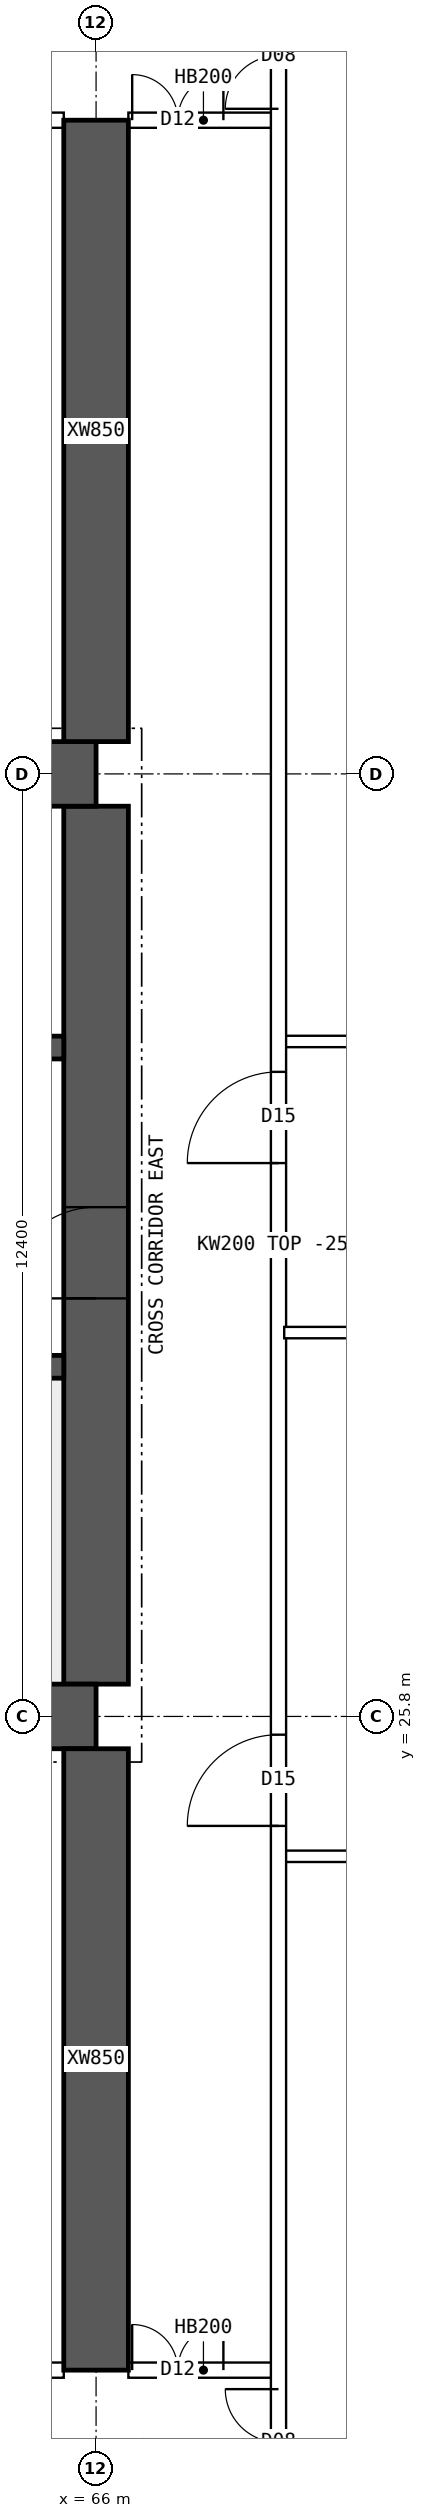
"""IFC4 building model, lengths in metres.
Left out: names, types, materials, properties, quantities, classifications, styles, units other than length and angle.
Written with IfcOpenShell. Run it as: python <this file> out.ifc"""

import sys

from ifc_helpers import new_model, si_unit, direction, frame, frame_2d, origin, place, context, subcontext, project, spatial, polyline, rectangle, outline, extrude, element, fill, save


model = new_model("IFC4")
c1 = context("Model", 3, precision=1e-05, world=origin(), true_north=direction((0.0, 1.0)))
c2 = subcontext(c1, "Body", "Model", "MODEL_VIEW")
j1 = project(units=[si_unit("LENGTHUNIT", "METRE"), si_unit("PLANEANGLEUNIT", "RADIAN")], contexts=[c1])
p1 = place(None, origin())
s1 = spatial("IfcSite", under=j1, at=p1, CompositionType="ELEMENT")
p2 = place(p1, origin())
s2 = spatial("IfcBuilding", under=s1, at=p2, CompositionType="ELEMENT")
p3 = place(p2, frame((0.0, 0.0, 163.6)))
s3 = spatial("IfcBuildingStorey", under=s2, at=p3, CompositionType="ELEMENT", Elevation=163.6)
for number, where, z_axis, x_axis in (
    (1, (18.0, 25.8, 0.0), (0.0, 0.0, 1.0), (1.0, 0.0, 0.0)),
    (2, (18.0, 38.2, 0.0), (0.0, 0.0, 1.0), (1.0, 0.0, 0.0)),
):
    element("IfcWall", number, at=place(p3, frame(where, z_axis=z_axis, x_axis=x_axis)), inside=s3, PredefinedType="SHEAR", context=c2, shape_type="SweptSolid", body=[
        extrude(rectangle(XDim=48.0, YDim=0.85, at=frame_2d((24.0, 0.0))), origin(), (0.0, 0.0, 1.0), 3.75),
    ])
p4 = place(p3, frame((66.0, 26.225, 0.0), z_axis=(0.0, 0.0, 1.0), x_axis=(0.0, 1.0, 0.0)))
e3 = element("IfcWall", 3, at=p4, inside=s3, PredefinedType="SHEAR", context=c2, shape_type="SweptSolid", body=[
    extrude(rectangle(XDim=11.55, YDim=0.85, at=frame_2d((5.775, 0.0))), origin(), (0.0, 0.0, 1.0), 3.75),
])
p5 = place(p4, frame((5.075, 0.0, 0.0)))
e4 = element("IfcOpeningElement", 4, at=p5, cuts=e3, PredefinedType="OPENING", context=c2, shape_type="SweptSolid", body=[
    extrude(rectangle(XDim=1.2, YDim=2.1, at=frame_2d((0.6, 1.05))), frame((0.0, 0.435, 0.0), z_axis=(0.0, -1.0, 0.0), x_axis=(1.0, 0.0, 0.0)), (0.0, 0.0, 1.0), 0.87),
])
p6 = place(p3, frame((18.425, 30.4, 0.0), z_axis=(0.0, 0.0, 1.0), x_axis=(1.0, 0.0, 0.0)))
e5 = element("IfcWall", 5, at=p6, inside=s3, PredefinedType="SHEAR", context=c2, shape_type="SweptSolid", body=[
    extrude(rectangle(XDim=47.15, YDim=0.3, at=frame_2d((23.575, 0.0))), origin(), (0.0, 0.0, 1.0), 3.75),
])
p7 = place(p6, frame((0.4, 0.0, 0.0)))
e6 = element("IfcOpeningElement", 6, at=p7, cuts=e5, PredefinedType="OPENING", context=c2, shape_type="SweptSolid", body=[
    extrude(rectangle(XDim=1.0, YDim=2.1, at=frame_2d((0.5, 1.05))), frame((0.0, 0.16, 0.0), z_axis=(0.0, -1.0, 0.0), x_axis=(1.0, 0.0, 0.0)), (0.0, 0.0, 1.0), 0.32),
])
p8 = place(p6, frame((45.75, 0.0, 0.0)))
e7 = element("IfcOpeningElement", 7, at=p8, cuts=e5, PredefinedType="OPENING", context=c2, shape_type="SweptSolid", body=[
    extrude(rectangle(XDim=1.0, YDim=2.1, at=frame_2d((0.5, 1.05))), frame((0.0, 0.16, 0.0), z_axis=(0.0, -1.0, 0.0), x_axis=(1.0, 0.0, 0.0)), (0.0, 0.0, 1.0), 0.32),
])
p9 = place(p6, frame((8.325, 0.0, 0.0)))
e8 = element("IfcOpeningElement", 8, at=p9, cuts=e5, PredefinedType="OPENING", context=c2, shape_type="SweptSolid", body=[
    extrude(rectangle(XDim=1.1, YDim=2.1, at=frame_2d((0.55, 1.05))), frame((0.0, 0.16, 0.0), z_axis=(0.0, -1.0, 0.0), x_axis=(1.0, 0.0, 0.0)), (0.0, 0.0, 1.0), 0.32),
])
p10 = place(p6, frame((10.925, 0.0, 0.0)))
e9 = element("IfcOpeningElement", 9, at=p10, cuts=e5, PredefinedType="OPENING", context=c2, shape_type="SweptSolid", body=[
    extrude(rectangle(XDim=1.1, YDim=2.1, at=frame_2d((0.55, 1.05))), frame((0.0, 0.16, 0.0), z_axis=(0.0, -1.0, 0.0), x_axis=(1.0, 0.0, 0.0)), (0.0, 0.0, 1.0), 0.32),
])
p11 = place(p6, frame((13.525, 0.0, 0.0)))
e10 = element("IfcOpeningElement", 10, at=p11, cuts=e5, PredefinedType="OPENING", context=c2, shape_type="SweptSolid", body=[
    extrude(rectangle(XDim=1.1, YDim=2.1, at=frame_2d((0.55, 1.05))), frame((0.0, 0.16, 0.0), z_axis=(0.0, -1.0, 0.0), x_axis=(1.0, 0.0, 0.0)), (0.0, 0.0, 1.0), 0.32),
])
p12 = place(p6, frame((16.125, 0.0, 0.0)))
e11 = element("IfcOpeningElement", 11, at=p12, cuts=e5, PredefinedType="OPENING", context=c2, shape_type="SweptSolid", body=[
    extrude(rectangle(XDim=1.1, YDim=2.1, at=frame_2d((0.55, 1.05))), frame((0.0, 0.16, 0.0), z_axis=(0.0, -1.0, 0.0), x_axis=(1.0, 0.0, 0.0)), (0.0, 0.0, 1.0), 0.32),
])
p13 = place(p6, frame((18.9, 0.0, 0.0)))
e12 = element("IfcOpeningElement", 12, at=p13, cuts=e5, PredefinedType="OPENING", context=c2, shape_type="SweptSolid", body=[
    extrude(rectangle(XDim=0.9, YDim=2.1, at=frame_2d((0.45, 1.05))), frame((0.0, 0.16, 0.0), z_axis=(0.0, -1.0, 0.0), x_axis=(1.0, 0.0, 0.0)), (0.0, 0.0, 1.0), 0.32),
])
p14 = place(p6, frame((30.192, 0.0, 0.0)))
e13 = element("IfcOpeningElement", 13, at=p14, cuts=e5, PredefinedType="OPENING", context=c2, shape_type="SweptSolid", body=[
    extrude(rectangle(XDim=1.1, YDim=2.1, at=frame_2d((0.55, 1.05))), frame((0.0, 0.16, 0.0), z_axis=(0.0, -1.0, 0.0), x_axis=(1.0, 0.0, 0.0)), (0.0, 0.0, 1.0), 0.32),
])
p15 = place(p6, frame((33.725, 0.0, 0.0)))
e14 = element("IfcOpeningElement", 14, at=p15, cuts=e5, PredefinedType="OPENING", context=c2, shape_type="SweptSolid", body=[
    extrude(rectangle(XDim=1.1, YDim=2.1, at=frame_2d((0.55, 1.05))), frame((0.0, 0.16, 0.0), z_axis=(0.0, -1.0, 0.0), x_axis=(1.0, 0.0, 0.0)), (0.0, 0.0, 1.0), 0.32),
])
p16 = place(p6, frame((37.258, 0.0, 0.0)))
e15 = element("IfcOpeningElement", 15, at=p16, cuts=e5, PredefinedType="OPENING", context=c2, shape_type="SweptSolid", body=[
    extrude(rectangle(XDim=1.1, YDim=2.1, at=frame_2d((0.55, 1.05))), frame((0.0, 0.16, 0.0), z_axis=(0.0, -1.0, 0.0), x_axis=(1.0, 0.0, 0.0)), (0.0, 0.0, 1.0), 0.32),
])
p17 = place(p3, frame((18.425, 34.6, 0.0), z_axis=(0.0, 0.0, 1.0), x_axis=(1.0, 0.0, 0.0)))
e16 = element("IfcWall", 16, at=p17, inside=s3, PredefinedType="SHEAR", context=c2, shape_type="SweptSolid", body=[
    extrude(rectangle(XDim=47.15, YDim=0.3, at=frame_2d((23.575, 0.0))), origin(), (0.0, 0.0, 1.0), 3.75),
])
p18 = place(p17, frame((0.9, 0.0, 0.0)))
e17 = element("IfcOpeningElement", 17, at=p18, cuts=e16, PredefinedType="OPENING", context=c2, shape_type="SweptSolid", body=[
    extrude(rectangle(XDim=1.1, YDim=2.1, at=frame_2d((0.55, 1.05))), frame((0.0, 0.16, 0.0), z_axis=(0.0, -1.0, 0.0), x_axis=(1.0, 0.0, 0.0)), (0.0, 0.0, 1.0), 0.32),
])
p19 = place(p17, frame((45.15, 0.0, 0.0)))
e18 = element("IfcOpeningElement", 18, at=p19, cuts=e16, PredefinedType="OPENING", context=c2, shape_type="SweptSolid", body=[
    extrude(rectangle(XDim=1.1, YDim=2.1, at=frame_2d((0.55, 1.05))), frame((0.0, 0.16, 0.0), z_axis=(0.0, -1.0, 0.0), x_axis=(1.0, 0.0, 0.0)), (0.0, 0.0, 1.0), 0.32),
])
p20 = place(p17, frame((4.175, 0.0, 0.0)))
e19 = element("IfcOpeningElement", 19, at=p20, cuts=e16, PredefinedType="OPENING", context=c2, shape_type="SweptSolid", body=[
    extrude(rectangle(XDim=0.9, YDim=2.1, at=frame_2d((0.45, 1.05))), frame((0.0, 0.16, 0.0), z_axis=(0.0, -1.0, 0.0), x_axis=(1.0, 0.0, 0.0)), (0.0, 0.0, 1.0), 0.32),
])
p21 = place(p17, frame((42.075, 0.0, 0.0)))
e20 = element("IfcOpeningElement", 20, at=p21, cuts=e16, PredefinedType="OPENING", context=c2, shape_type="SweptSolid", body=[
    extrude(rectangle(XDim=0.9, YDim=2.1, at=frame_2d((0.45, 1.05))), frame((0.0, 0.16, 0.0), z_axis=(0.0, -1.0, 0.0), x_axis=(1.0, 0.0, 0.0)), (0.0, 0.0, 1.0), 0.32),
])
p22 = place(p17, frame((8.95, 0.0, 0.0)))
e21 = element("IfcOpeningElement", 21, at=p22, cuts=e16, PredefinedType="OPENING", context=c2, shape_type="SweptSolid", body=[
    extrude(rectangle(XDim=0.9, YDim=2.1, at=frame_2d((0.45, 1.05))), frame((0.0, 0.16, 0.0), z_axis=(0.0, -1.0, 0.0), x_axis=(1.0, 0.0, 0.0)), (0.0, 0.0, 1.0), 0.32),
])
p23 = place(p17, frame((12.924, 0.0, 0.0)))
e22 = element("IfcOpeningElement", 22, at=p23, cuts=e16, PredefinedType="OPENING", context=c2, shape_type="SweptSolid", body=[
    extrude(rectangle(XDim=0.9, YDim=2.1, at=frame_2d((0.45, 1.05))), frame((0.0, 0.16, 0.0), z_axis=(0.0, -1.0, 0.0), x_axis=(1.0, 0.0, 0.0)), (0.0, 0.0, 1.0), 0.32),
])
p24 = place(p17, frame((16.571, 0.0, 0.0)))
e23 = element("IfcOpeningElement", 23, at=p24, cuts=e16, PredefinedType="OPENING", context=c2, shape_type="SweptSolid", body=[
    extrude(rectangle(XDim=0.9, YDim=2.1, at=frame_2d((0.45, 1.05))), frame((0.0, 0.16, 0.0), z_axis=(0.0, -1.0, 0.0), x_axis=(1.0, 0.0, 0.0)), (0.0, 0.0, 1.0), 0.32),
])
p25 = place(p17, frame((20.33, 0.0, 0.0)))
e24 = element("IfcOpeningElement", 24, at=p25, cuts=e16, PredefinedType="OPENING", context=c2, shape_type="SweptSolid", body=[
    extrude(rectangle(XDim=0.9, YDim=2.1, at=frame_2d((0.45, 1.05))), frame((0.0, 0.16, 0.0), z_axis=(0.0, -1.0, 0.0), x_axis=(1.0, 0.0, 0.0)), (0.0, 0.0, 1.0), 0.32),
])
p26 = place(p17, frame((24.736, 0.0, 0.0)))
e25 = element("IfcOpeningElement", 25, at=p26, cuts=e16, PredefinedType="OPENING", context=c2, shape_type="SweptSolid", body=[
    extrude(rectangle(XDim=0.9, YDim=2.1, at=frame_2d((0.45, 1.05))), frame((0.0, 0.16, 0.0), z_axis=(0.0, -1.0, 0.0), x_axis=(1.0, 0.0, 0.0)), (0.0, 0.0, 1.0), 0.32),
])
p27 = place(p17, frame((27.533, 0.0, 0.0)))
e26 = element("IfcOpeningElement", 26, at=p27, cuts=e16, PredefinedType="OPENING", context=c2, shape_type="SweptSolid", body=[
    extrude(rectangle(XDim=0.9, YDim=2.1, at=frame_2d((0.45, 1.05))), frame((0.0, 0.16, 0.0), z_axis=(0.0, -1.0, 0.0), x_axis=(1.0, 0.0, 0.0)), (0.0, 0.0, 1.0), 0.32),
])
p28 = place(p17, frame((29.906, 0.0, 0.0)))
e27 = element("IfcOpeningElement", 27, at=p28, cuts=e16, PredefinedType="OPENING", context=c2, shape_type="SweptSolid", body=[
    extrude(rectangle(XDim=0.9, YDim=2.1, at=frame_2d((0.45, 1.05))), frame((0.0, 0.16, 0.0), z_axis=(0.0, -1.0, 0.0), x_axis=(1.0, 0.0, 0.0)), (0.0, 0.0, 1.0), 0.32),
])
p29 = place(p17, frame((33.756, 0.0, 0.0)))
e28 = element("IfcOpeningElement", 28, at=p29, cuts=e16, PredefinedType="OPENING", context=c2, shape_type="SweptSolid", body=[
    extrude(rectangle(XDim=0.9, YDim=2.1, at=frame_2d((0.45, 1.05))), frame((0.0, 0.16, 0.0), z_axis=(0.0, -1.0, 0.0), x_axis=(1.0, 0.0, 0.0)), (0.0, 0.0, 1.0), 0.32),
])
p30 = place(p17, frame((37.504, 0.0, 0.0)))
e29 = element("IfcOpeningElement", 29, at=p30, cuts=e16, PredefinedType="OPENING", context=c2, shape_type="SweptSolid", body=[
    extrude(rectangle(XDim=0.9, YDim=2.1, at=frame_2d((0.45, 1.05))), frame((0.0, 0.16, 0.0), z_axis=(0.0, -1.0, 0.0), x_axis=(1.0, 0.0, 0.0)), (0.0, 0.0, 1.0), 0.32),
])
for number, where, z_axis, x_axis in (
    (30, (66.0, 17.2, 0.0), (0.0, 0.0, 1.0), (0.0, 1.0, 0.0)),
    (31, (66.0, 38.625, 0.0), (0.0, 0.0, 1.0), (0.0, 1.0, 0.0)),
):
    element("IfcWall", number, at=place(p3, frame(where, z_axis=z_axis, x_axis=x_axis)), inside=s3, PredefinedType="SHEAR", context=c2, shape_type="SweptSolid", body=[
        extrude(rectangle(XDim=8.175, YDim=0.85, at=frame_2d((4.087, 0.0))), origin(), (0.0, 0.0, 1.0), 3.75),
    ])
p31 = place(p3, frame((60.425, 17.2, 0.0), z_axis=(0.0, 0.0, 1.0), x_axis=(1.0, 0.0, 0.0)))
e32 = element("IfcWall", 32, at=p31, inside=s3, PredefinedType="SOLIDWALL", context=c2, shape_type="SweptSolid", body=[
    extrude(rectangle(XDim=5.15, YDim=0.2, at=frame_2d((2.575, 0.0))), origin(), (0.0, 0.0, 1.0), 3.5),
])
p32 = place(p31, frame((0.45, 0.0, 0.0)))
e33 = element("IfcOpeningElement", 33, at=p32, cuts=e32, PredefinedType="OPENING", context=c2, shape_type="SweptSolid", body=[
    extrude(rectangle(XDim=1.0, YDim=2.1, at=frame_2d((0.5, 1.05))), frame((0.0, 0.11, 0.0), z_axis=(0.0, -1.0, 0.0), x_axis=(1.0, 0.0, 0.0)), (0.0, 0.0, 1.0), 0.22),
])
p33 = place(p3, frame((66.425, 17.2, 0.0), z_axis=(0.0, 0.0, 1.0), x_axis=(1.0, 0.0, 0.0)))
e34 = element("IfcWall", 34, at=p33, inside=s3, PredefinedType="SOLIDWALL", context=c2, shape_type="SweptSolid", body=[
    extrude(rectangle(XDim=1.975, YDim=0.2, at=frame_2d((0.987, 0.0))), origin(), (0.0, 0.0, 1.0), 3.5),
])
p34 = place(p33, frame((0.05, 0.0, 0.0)))
e35 = element("IfcOpeningElement", 35, at=p34, cuts=e34, PredefinedType="OPENING", context=c2, shape_type="SweptSolid", body=[
    extrude(rectangle(XDim=1.2, YDim=2.1, at=frame_2d((0.6, 1.05))), frame((0.0, 0.11, 0.0), z_axis=(0.0, -1.0, 0.0), x_axis=(1.0, 0.0, 0.0)), (0.0, 0.0, 1.0), 0.22),
])
p35 = place(p3, frame((60.425, 46.8, 0.0), z_axis=(0.0, 0.0, 1.0), x_axis=(1.0, 0.0, 0.0)))
e36 = element("IfcWall", 36, at=p35, inside=s3, PredefinedType="SOLIDWALL", context=c2, shape_type="SweptSolid", body=[
    extrude(rectangle(XDim=5.15, YDim=0.2, at=frame_2d((2.575, 0.0))), origin(), (0.0, 0.0, 1.0), 3.5),
])
p36 = place(p35, frame((0.15, 0.0, 0.0)))
e37 = element("IfcOpeningElement", 37, at=p36, cuts=e36, PredefinedType="OPENING", context=c2, shape_type="SweptSolid", body=[
    extrude(rectangle(XDim=0.9, YDim=2.1, at=frame_2d((0.45, 1.05))), frame((0.0, 0.11, 0.0), z_axis=(0.0, -1.0, 0.0), x_axis=(1.0, 0.0, 0.0)), (0.0, 0.0, 1.0), 0.22),
])
p37 = place(p35, frame((3.605, 0.0, 0.0)))
e38 = element("IfcOpeningElement", 38, at=p37, cuts=e36, PredefinedType="OPENING", context=c2, shape_type="SweptSolid", body=[
    extrude(rectangle(XDim=0.9, YDim=2.1, at=frame_2d((0.45, 1.05))), frame((0.0, 0.11, 0.0), z_axis=(0.0, -1.0, 0.0), x_axis=(1.0, 0.0, 0.0)), (0.0, 0.0, 1.0), 0.22),
])
p38 = place(p3, frame((66.425, 46.8, 0.0), z_axis=(0.0, 0.0, 1.0), x_axis=(1.0, 0.0, 0.0)))
e39 = element("IfcWall", 39, at=p38, inside=s3, PredefinedType="SOLIDWALL", context=c2, shape_type="SweptSolid", body=[
    extrude(rectangle(XDim=1.975, YDim=0.2, at=frame_2d((0.987, 0.0))), origin(), (0.0, 0.0, 1.0), 3.5),
])
p39 = place(p38, frame((0.05, 0.0, 0.0)))
e40 = element("IfcOpeningElement", 40, at=p39, cuts=e39, PredefinedType="OPENING", context=c2, shape_type="SweptSolid", body=[
    extrude(rectangle(XDim=1.2, YDim=2.1, at=frame_2d((0.6, 1.05))), frame((0.0, 0.11, 0.0), z_axis=(0.0, -1.0, 0.0), x_axis=(1.0, 0.0, 0.0)), (0.0, 0.0, 1.0), 0.22),
])
p40 = place(p3, frame((68.475, 30.85, 0.0), z_axis=(0.0, 0.0, 1.0), x_axis=(1.0, 0.0, 0.0)))
e41 = element("IfcWall", 41, at=p40, inside=s3, PredefinedType="PARTITIONING", context=c2, shape_type="SweptSolid", body=[
    extrude(outline(polyline([(0.0, 0.0), (6.82, 0.0), (6.82, 3.5), (3.827, 3.5), (3.825, 3.05), (3.227, 3.05), (3.225, 3.5), (0.0, 3.5), (0.0, 0.0)])), frame((0.0, 0.075, 0.0), z_axis=(0.0, -1.0, 0.0), x_axis=(1.0, 0.0, 0.0)), (0.0, 0.0, 1.0), 0.15),
])
p41 = place(p3, frame((68.4, 10.446, 0.0), z_axis=(0.0, 0.0, 1.0), x_axis=(0.0, 1.0, 0.0)))
e42 = element("IfcWall", 42, at=p41, inside=s3, PredefinedType="SOLIDWALL", context=c2, shape_type="SweptSolid", body=[
    extrude(rectangle(XDim=43.107, YDim=0.2, at=frame_2d((21.554, 0.0))), origin(), (0.0, 0.0, 1.0), 3.5),
])
p42 = place(p41, frame((13.914, 0.0, 0.0)))
e43 = element("IfcOpeningElement", 43, at=p42, cuts=e42, PredefinedType="OPENING", context=c2, shape_type="SweptSolid", body=[
    extrude(rectangle(XDim=1.2, YDim=2.1, at=frame_2d((0.6, 1.05))), frame((0.0, 0.11, 0.0), z_axis=(0.0, -1.0, 0.0), x_axis=(1.0, 0.0, 0.0)), (0.0, 0.0, 1.0), 0.22),
])
p43 = place(p41, frame((22.634, 0.0, 0.0)))
e44 = element("IfcOpeningElement", 44, at=p43, cuts=e42, PredefinedType="OPENING", context=c2, shape_type="SweptSolid", body=[
    extrude(rectangle(XDim=1.2, YDim=2.1, at=frame_2d((0.6, 1.05))), frame((0.0, 0.11, 0.0), z_axis=(0.0, -1.0, 0.0), x_axis=(1.0, 0.0, 0.0)), (0.0, 0.0, 1.0), 0.22),
])
p44 = place(p41, frame((5.104, 0.0, 0.0)))
e45 = element("IfcOpeningElement", 45, at=p44, cuts=e42, PredefinedType="OPENING", context=c2, shape_type="SweptSolid", body=[
    extrude(rectangle(XDim=1.4, YDim=2.1, at=frame_2d((0.7, 1.05))), frame((0.0, 0.11, 0.0), z_axis=(0.0, -1.0, 0.0), x_axis=(1.0, 0.0, 0.0)), (0.0, 0.0, 1.0), 0.22),
])
p45 = place(p41, frame((36.504, 0.0, 0.0)))
e46 = element("IfcOpeningElement", 46, at=p45, cuts=e42, PredefinedType="OPENING", context=c2, shape_type="SweptSolid", body=[
    extrude(rectangle(XDim=1.4, YDim=2.1, at=frame_2d((0.7, 1.05))), frame((0.0, 0.11, 0.0), z_axis=(0.0, -1.0, 0.0), x_axis=(1.0, 0.0, 0.0)), (0.0, 0.0, 1.0), 0.22),
])
p46 = place(p3, frame((68.475, 23.96, 0.0), z_axis=(0.0, 0.0, 1.0), x_axis=(1.0, 0.0, 0.0)))
e47 = element("IfcWall", 47, at=p46, inside=s3, PredefinedType="PARTITIONING", context=c2, shape_type="SweptSolid", body=[
    extrude(rectangle(XDim=6.82, YDim=0.15, at=frame_2d((3.41, 0.0))), origin(), (0.0, 0.0, 1.0), 3.5),
])
p47 = place(p3, frame((68.475, 34.68, 0.0), z_axis=(0.0, 0.0, 1.0), x_axis=(1.0, 0.0, 0.0)))
e48 = element("IfcWall", 48, at=p47, inside=s3, PredefinedType="PARTITIONING", context=c2, shape_type="SweptSolid", body=[
    extrude(outline(polyline([(0.0, 0.0), (6.82, 0.0), (6.82, 3.5), (3.827, 3.5), (3.825, 3.05), (3.227, 3.05), (3.225, 3.5), (0.0, 3.5), (0.0, 0.0)])), frame((0.0, 0.075, 0.0), z_axis=(0.0, -1.0, 0.0), x_axis=(1.0, 0.0, 0.0)), (0.0, 0.0, 1.0), 0.15),
])
p48 = place(p5, origin())
e49 = element("IfcDoor", 49, at=p48, inside=s3, OperationType="SINGLE_SWING_LEFT", PredefinedType="DOOR", context=c2, shape_type="SweptSolid", body=[
    extrude(rectangle(XDim=1.2, YDim=2.1, at=frame_2d((0.6, 1.05))), frame((0.0, 0.025, 0.0), z_axis=(0.0, -1.0, 0.0), x_axis=(1.0, 0.0, 0.0)), (0.0, 0.0, 1.0), 0.05),
])
fill(e4, e49)
p49 = place(p34, origin())
e50 = element("IfcDoor", 50, at=p49, inside=s3, OperationType="DOUBLE_DOOR_SINGLE_SWING", PredefinedType="DOOR", context=c2, shape_type="SweptSolid", body=[
    extrude(rectangle(XDim=1.2, YDim=2.1, at=frame_2d((0.6, 1.05))), frame((0.0, 0.025, 0.0), z_axis=(0.0, -1.0, 0.0), x_axis=(1.0, 0.0, 0.0)), (0.0, 0.0, 1.0), 0.05),
])
fill(e35, e50)
p50 = place(p39, origin())
e51 = element("IfcDoor", 51, at=p50, inside=s3, OperationType="DOUBLE_DOOR_SINGLE_SWING", PredefinedType="DOOR", context=c2, shape_type="SweptSolid", body=[
    extrude(rectangle(XDim=1.2, YDim=2.1, at=frame_2d((0.6, 1.05))), frame((0.0, 0.025, 0.0), z_axis=(0.0, -1.0, 0.0), x_axis=(1.0, 0.0, 0.0)), (0.0, 0.0, 1.0), 0.05),
])
fill(e40, e51)
p51 = place(p42, origin())
e52 = element("IfcDoor", 52, at=p51, inside=s3, OperationType="SINGLE_SWING_LEFT", PredefinedType="DOOR", context=c2, shape_type="SweptSolid", body=[
    extrude(rectangle(XDim=1.2, YDim=2.1, at=frame_2d((0.6, 1.05))), frame((0.0, 0.025, 0.0), z_axis=(0.0, -1.0, 0.0), x_axis=(1.0, 0.0, 0.0)), (0.0, 0.0, 1.0), 0.05),
])
fill(e43, e52)
p52 = place(p43, origin())
e53 = element("IfcDoor", 53, at=p52, inside=s3, OperationType="SINGLE_SWING_LEFT", PredefinedType="DOOR", context=c2, shape_type="SweptSolid", body=[
    extrude(rectangle(XDim=1.2, YDim=2.1, at=frame_2d((0.6, 1.05))), frame((0.0, 0.025, 0.0), z_axis=(0.0, -1.0, 0.0), x_axis=(1.0, 0.0, 0.0)), (0.0, 0.0, 1.0), 0.05),
])
fill(e44, e53)
p53 = place(p44, origin())
e54 = element("IfcDoor", 54, at=p53, inside=s3, OperationType="DOUBLE_DOOR_SINGLE_SWING", PredefinedType="DOOR", context=c2, shape_type="SweptSolid", body=[
    extrude(rectangle(XDim=1.4, YDim=2.1, at=frame_2d((0.7, 1.05))), frame((0.0, 0.025, 0.0), z_axis=(0.0, -1.0, 0.0), x_axis=(1.0, 0.0, 0.0)), (0.0, 0.0, 1.0), 0.05),
])
fill(e45, e54)
p54 = place(p45, origin())
e55 = element("IfcDoor", 55, at=p54, inside=s3, OperationType="DOUBLE_DOOR_SINGLE_SWING", PredefinedType="DOOR", context=c2, shape_type="SweptSolid", body=[
    extrude(rectangle(XDim=1.4, YDim=2.1, at=frame_2d((0.7, 1.05))), frame((0.0, 0.025, 0.0), z_axis=(0.0, -1.0, 0.0), x_axis=(1.0, 0.0, 0.0)), (0.0, 0.0, 1.0), 0.05),
])
fill(e46, e55)
save(model, sys.argv[1])
